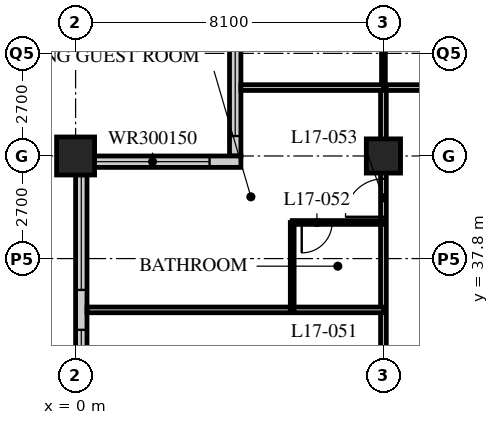
"""IFC4 building model, lengths in metres.
Left out: names, types, materials, properties, quantities, classifications, styles, units other than length and angle.
Written with IfcOpenShell. Run it as: python <this file> out.ifc"""

import sys

from ifc_helpers import new_model, si_unit, direction, frame, frame_2d, origin, origin_2d, place, context, subcontext, project, spatial, rectangle, hollow_rectangle, extrude, element, fill, save


model = new_model("IFC4")
c1 = context("Model", 3, precision=1e-05, world=origin(), true_north=direction((0.0, 1.0)))
c2 = subcontext(c1, "Body", "Model", "MODEL_VIEW")
j1 = project(units=[si_unit("LENGTHUNIT", "METRE"), si_unit("PLANEANGLEUNIT", "RADIAN")], contexts=[c1])
p1 = place(None, origin())
s1 = spatial("IfcSite", under=j1, at=p1, CompositionType="ELEMENT")
p2 = place(p1, origin())
s2 = spatial("IfcBuilding", under=s1, at=p2, CompositionType="ELEMENT")
p3 = place(p2, frame((0.0, 0.0, 70.4)))
s3 = spatial("IfcBuildingStorey", under=s2, at=p3, CompositionType="ELEMENT", Elevation=70.4)
p4 = place(p3, frame((0.0, 40.5, 0.0), z_axis=(0.0, 0.0, 1.0), x_axis=(1.0, 0.0, 0.0)))
e1 = element("IfcColumn", 1, at=p4, inside=s3, PredefinedType="COLUMN", context=c2, shape_type="SweptSolid", body=[
    extrude(hollow_rectangle(XDim=1.0, YDim=1.0, WallThickness=0.1, at=origin_2d()), origin(), (0.0, 0.0, 1.0), 3.4),
])
p5 = place(p3, frame((8.1, 40.5, 0.0), z_axis=(0.0, 0.0, 1.0), x_axis=(1.0, 0.0, 0.0)))
e2 = element("IfcColumn", 2, at=p5, inside=s3, PredefinedType="COLUMN", context=c2, shape_type="SweptSolid", body=[
    extrude(hollow_rectangle(XDim=0.9, YDim=0.9, WallThickness=0.09, at=origin_2d()), origin(), (0.0, 0.0, 1.0), 3.4),
])
p6 = place(p3, frame((4.2, 44.25, 0.0), z_axis=(0.0, 0.0, 1.0), x_axis=(0.0, -1.0, 0.0)))
e3 = element("IfcWall", 3, at=p6, inside=s3, PredefinedType="SOLIDWALL", context=c2, shape_type="SweptSolid", body=[
    extrude(rectangle(XDim=3.75, YDim=0.3, at=frame_2d((1.875, 0.0))), origin(), (0.0, 0.0, 1.0), 3.19),
])
p7 = place(p6, frame((0.225, 0.0, 0.9)))
e4 = element("IfcOpeningElement", 4, at=p7, cuts=e3, PredefinedType="OPENING", context=c2, shape_type="SweptSolid", body=[
    extrude(rectangle(XDim=3.0, YDim=1.5, at=frame_2d((1.5, 0.75))), frame((0.0, 0.16, 0.0), z_axis=(0.0, -1.0, 0.0), x_axis=(1.0, 0.0, 0.0)), (0.0, 0.0, 1.0), 0.32),
])
p8 = place(p3, frame((4.35, 40.35, 0.0), z_axis=(0.0, 0.0, 1.0), x_axis=(-1.0, 0.0, 0.0)))
e5 = element("IfcWall", 5, at=p8, inside=s3, PredefinedType="SOLIDWALL", context=c2, shape_type="SweptSolid", body=[
    extrude(rectangle(XDim=4.35, YDim=0.3, at=frame_2d((2.175, 0.0))), origin(), (0.0, 0.0, 1.0), 3.19),
])
p9 = place(p8, frame((0.825, 0.0, 0.9)))
e6 = element("IfcOpeningElement", 6, at=p9, cuts=e5, PredefinedType="OPENING", context=c2, shape_type="SweptSolid", body=[
    extrude(rectangle(XDim=3.0, YDim=1.5, at=frame_2d((1.5, 0.75))), frame((0.0, 0.16, 0.0), z_axis=(0.0, -1.0, 0.0), x_axis=(1.0, 0.0, 0.0)), (0.0, 0.0, 1.0), 0.32),
])
p10 = place(p3, frame((0.15, 40.2, 0.0), z_axis=(0.0, 0.0, 1.0), x_axis=(0.0, -1.0, 0.0)))
e7 = element("IfcWall", 7, at=p10, inside=s3, PredefinedType="SOLIDWALL", context=c2, shape_type="SweptSolid", body=[
    extrude(rectangle(XDim=32.1, YDim=0.3, at=frame_2d((16.05, 0.0))), origin(), (0.0, 0.0, 1.0), 3.19),
])
p11 = place(p10, frame((0.225, 0.0, 0.9)))
e8 = element("IfcOpeningElement", 8, at=p11, cuts=e7, PredefinedType="OPENING", context=c2, shape_type="SweptSolid", body=[
    extrude(rectangle(XDim=3.0, YDim=2.0, at=frame_2d((1.5, 1.0))), frame((0.0, 0.16, 0.0), z_axis=(0.0, -1.0, 0.0), x_axis=(1.0, 0.0, 0.0)), (0.0, 0.0, 1.0), 0.32),
])
p12 = place(p10, frame((4.275, 0.0, 0.9)))
e9 = element("IfcOpeningElement", 9, at=p12, cuts=e7, PredefinedType="OPENING", context=c2, shape_type="SweptSolid", body=[
    extrude(rectangle(XDim=3.0, YDim=2.0, at=frame_2d((1.5, 1.0))), frame((0.0, 0.16, 0.0), z_axis=(0.0, -1.0, 0.0), x_axis=(1.0, 0.0, 0.0)), (0.0, 0.0, 1.0), 0.32),
])
p13 = place(p10, frame((8.325, 0.0, 0.9)))
e10 = element("IfcOpeningElement", 10, at=p13, cuts=e7, PredefinedType="OPENING", context=c2, shape_type="SweptSolid", body=[
    extrude(rectangle(XDim=3.0, YDim=2.0, at=frame_2d((1.5, 1.0))), frame((0.0, 0.16, 0.0), z_axis=(0.0, -1.0, 0.0), x_axis=(1.0, 0.0, 0.0)), (0.0, 0.0, 1.0), 0.32),
])
p14 = place(p10, frame((12.375, 0.0, 0.9)))
e11 = element("IfcOpeningElement", 11, at=p14, cuts=e7, PredefinedType="OPENING", context=c2, shape_type="SweptSolid", body=[
    extrude(rectangle(XDim=3.0, YDim=2.0, at=frame_2d((1.5, 1.0))), frame((0.0, 0.16, 0.0), z_axis=(0.0, -1.0, 0.0), x_axis=(1.0, 0.0, 0.0)), (0.0, 0.0, 1.0), 0.32),
])
p15 = place(p10, frame((16.425, 0.0, 0.9)))
e12 = element("IfcOpeningElement", 12, at=p15, cuts=e7, PredefinedType="OPENING", context=c2, shape_type="SweptSolid", body=[
    extrude(rectangle(XDim=3.0, YDim=2.0, at=frame_2d((1.5, 1.0))), frame((0.0, 0.16, 0.0), z_axis=(0.0, -1.0, 0.0), x_axis=(1.0, 0.0, 0.0)), (0.0, 0.0, 1.0), 0.32),
])
p16 = place(p10, frame((20.475, 0.0, 0.9)))
e13 = element("IfcOpeningElement", 13, at=p16, cuts=e7, PredefinedType="OPENING", context=c2, shape_type="SweptSolid", body=[
    extrude(rectangle(XDim=3.0, YDim=2.0, at=frame_2d((1.5, 1.0))), frame((0.0, 0.16, 0.0), z_axis=(0.0, -1.0, 0.0), x_axis=(1.0, 0.0, 0.0)), (0.0, 0.0, 1.0), 0.32),
])
p17 = place(p10, frame((24.525, 0.0, 0.9)))
e14 = element("IfcOpeningElement", 14, at=p17, cuts=e7, PredefinedType="OPENING", context=c2, shape_type="SweptSolid", body=[
    extrude(rectangle(XDim=3.0, YDim=2.0, at=frame_2d((1.5, 1.0))), frame((0.0, 0.16, 0.0), z_axis=(0.0, -1.0, 0.0), x_axis=(1.0, 0.0, 0.0)), (0.0, 0.0, 1.0), 0.32),
])
p18 = place(p10, frame((28.575, 0.0, 0.9)))
e15 = element("IfcOpeningElement", 15, at=p18, cuts=e7, PredefinedType="OPENING", context=c2, shape_type="SweptSolid", body=[
    extrude(rectangle(XDim=3.0, YDim=2.0, at=frame_2d((1.5, 1.0))), frame((0.0, 0.16, 0.0), z_axis=(0.0, -1.0, 0.0), x_axis=(1.0, 0.0, 0.0)), (0.0, 0.0, 1.0), 0.32),
])
p19 = place(p3, frame((8.1, 42.3, 0.0), z_axis=(0.0, 0.0, 1.0), x_axis=(1.0, 0.0, 0.0)))
e16 = element("IfcWall", 16, at=p19, inside=s3, PredefinedType="PARTITIONING", context=c2, shape_type="SweptSolid", body=[
    extrude(rectangle(XDim=36.45, YDim=0.15, at=frame_2d((18.225, 0.0))), origin(), (0.0, 0.0, 1.0), 3.19),
])
p20 = place(p19, frame((9.5, 0.0, 0.0)))
e17 = element("IfcOpeningElement", 17, at=p20, cuts=e16, PredefinedType="OPENING", context=c2, shape_type="SweptSolid", body=[
    extrude(rectangle(XDim=1.0, YDim=2.1, at=frame_2d((0.5, 1.05))), frame((0.0, 0.085, 0.0), z_axis=(0.0, -1.0, 0.0), x_axis=(1.0, 0.0, 0.0)), (0.0, 0.0, 1.0), 0.17),
])
p21 = place(p19, frame((14.6, 0.0, 0.0)))
e18 = element("IfcOpeningElement", 18, at=p21, cuts=e16, PredefinedType="OPENING", context=c2, shape_type="SweptSolid", body=[
    extrude(rectangle(XDim=1.0, YDim=2.1, at=frame_2d((0.5, 1.05))), frame((0.0, 0.085, 0.0), z_axis=(0.0, -1.0, 0.0), x_axis=(1.0, 0.0, 0.0)), (0.0, 0.0, 1.0), 0.17),
])
p22 = place(p19, frame((18.65, 0.0, 0.0)))
e19 = element("IfcOpeningElement", 19, at=p22, cuts=e16, PredefinedType="OPENING", context=c2, shape_type="SweptSolid", body=[
    extrude(rectangle(XDim=1.0, YDim=2.1, at=frame_2d((0.5, 1.05))), frame((0.0, 0.085, 0.0), z_axis=(0.0, -1.0, 0.0), x_axis=(1.0, 0.0, 0.0)), (0.0, 0.0, 1.0), 0.17),
])
p23 = place(p19, frame((25.7, 0.0, 0.0)))
e20 = element("IfcOpeningElement", 20, at=p23, cuts=e16, PredefinedType="OPENING", context=c2, shape_type="SweptSolid", body=[
    extrude(rectangle(XDim=1.0, YDim=2.1, at=frame_2d((0.5, 1.05))), frame((0.0, 0.085, 0.0), z_axis=(0.0, -1.0, 0.0), x_axis=(1.0, 0.0, 0.0)), (0.0, 0.0, 1.0), 0.17),
])
p24 = place(p19, frame((30.8, 0.0, 0.0)))
e21 = element("IfcOpeningElement", 21, at=p24, cuts=e16, PredefinedType="OPENING", context=c2, shape_type="SweptSolid", body=[
    extrude(rectangle(XDim=1.0, YDim=2.1, at=frame_2d((0.5, 1.05))), frame((0.0, 0.085, 0.0), z_axis=(0.0, -1.0, 0.0), x_axis=(1.0, 0.0, 0.0)), (0.0, 0.0, 1.0), 0.17),
])
p25 = place(p19, frame((32.825, 0.0, 0.0)))
e22 = element("IfcOpeningElement", 22, at=p25, cuts=e16, PredefinedType="OPENING", context=c2, shape_type="SweptSolid", body=[
    extrude(rectangle(XDim=1.0, YDim=2.1, at=frame_2d((0.5, 1.05))), frame((0.0, 0.085, 0.0), z_axis=(0.0, -1.0, 0.0), x_axis=(1.0, 0.0, 0.0)), (0.0, 0.0, 1.0), 0.17),
])
p26 = place(p19, frame((2.625, 0.0, 0.0)))
e23 = element("IfcOpeningElement", 23, at=p26, cuts=e16, PredefinedType="OPENING", context=c2, shape_type="SweptSolid", body=[
    extrude(rectangle(XDim=1.0, YDim=2.1, at=frame_2d((0.5, 1.05))), frame((0.0, 0.085, 0.0), z_axis=(0.0, -1.0, 0.0), x_axis=(1.0, 0.0, 0.0)), (0.0, 0.0, 1.0), 0.17),
])
p27 = place(p3, frame((8.1, 12.15, 0.0), z_axis=(0.0, 0.0, 1.0), x_axis=(0.0, 1.0, 0.0)))
e24 = element("IfcWall", 24, at=p27, inside=s3, PredefinedType="PARTITIONING", context=c2, shape_type="SweptSolid", body=[
    extrude(rectangle(XDim=30.15, YDim=0.15, at=frame_2d((15.075, 0.0))), origin(), (0.0, 0.0, 1.0), 2.578),
])
p28 = place(p27, frame((0.6, 0.0, 0.0)))
e25 = element("IfcOpeningElement", 25, at=p28, cuts=e24, PredefinedType="OPENING", context=c2, shape_type="SweptSolid", body=[
    extrude(rectangle(XDim=1.0, YDim=2.1, at=frame_2d((0.5, 1.05))), frame((0.0, 0.085, 0.0), z_axis=(0.0, -1.0, 0.0), x_axis=(1.0, 0.0, 0.0)), (0.0, 0.0, 1.0), 0.17),
])
p29 = place(p27, frame((6.8, 0.0, 0.0)))
e26 = element("IfcOpeningElement", 26, at=p29, cuts=e24, PredefinedType="OPENING", context=c2, shape_type="SweptSolid", body=[
    extrude(rectangle(XDim=1.0, YDim=2.1, at=frame_2d((0.5, 1.05))), frame((0.0, 0.085, 0.0), z_axis=(0.0, -1.0, 0.0), x_axis=(1.0, 0.0, 0.0)), (0.0, 0.0, 1.0), 0.17),
])
p30 = place(p27, frame((8.7, 0.0, 0.0)))
e27 = element("IfcOpeningElement", 27, at=p30, cuts=e24, PredefinedType="OPENING", context=c2, shape_type="SweptSolid", body=[
    extrude(rectangle(XDim=1.0, YDim=2.1, at=frame_2d((0.5, 1.05))), frame((0.0, 0.085, 0.0), z_axis=(0.0, -1.0, 0.0), x_axis=(1.0, 0.0, 0.0)), (0.0, 0.0, 1.0), 0.17),
])
p31 = place(p27, frame((14.6, 0.0, 0.0)))
e28 = element("IfcOpeningElement", 28, at=p31, cuts=e24, PredefinedType="OPENING", context=c2, shape_type="SweptSolid", body=[
    extrude(rectangle(XDim=1.0, YDim=2.1, at=frame_2d((0.5, 1.05))), frame((0.0, 0.085, 0.0), z_axis=(0.0, -1.0, 0.0), x_axis=(1.0, 0.0, 0.0)), (0.0, 0.0, 1.0), 0.17),
])
p32 = place(p27, frame((21.65, 0.0, 0.0)))
e29 = element("IfcOpeningElement", 29, at=p32, cuts=e24, PredefinedType="OPENING", context=c2, shape_type="SweptSolid", body=[
    extrude(rectangle(XDim=1.0, YDim=2.1, at=frame_2d((0.5, 1.05))), frame((0.0, 0.085, 0.0), z_axis=(0.0, -1.0, 0.0), x_axis=(1.0, 0.0, 0.0)), (0.0, 0.0, 1.0), 0.17),
])
p33 = place(p27, frame((26.75, 0.0, 0.0)))
e30 = element("IfcOpeningElement", 30, at=p33, cuts=e24, PredefinedType="OPENING", context=c2, shape_type="SweptSolid", body=[
    extrude(rectangle(XDim=1.0, YDim=2.1, at=frame_2d((0.5, 1.05))), frame((0.0, 0.085, 0.0), z_axis=(0.0, -1.0, 0.0), x_axis=(1.0, 0.0, 0.0)), (0.0, 0.0, 1.0), 0.17),
])
p34 = place(p3, frame((8.1, 36.45, 0.0), z_axis=(0.0, 0.0, 1.0), x_axis=(-1.0, 0.0, 0.0)))
e31 = element("IfcWall", 31, at=p34, inside=s3, PredefinedType="PARTITIONING", context=c2, shape_type="SweptSolid", body=[
    extrude(rectangle(XDim=7.8, YDim=0.15, at=frame_2d((3.9, 0.0))), origin(), (0.0, 0.0, 1.0), 3.19),
])
p35 = place(p3, frame((5.7, 36.45, 0.0), z_axis=(0.0, 0.0, 1.0), x_axis=(0.0, 1.0, 0.0)))
e32 = element("IfcWall", 32, at=p35, inside=s3, PredefinedType="PARTITIONING", context=c2, shape_type="SweptSolid", body=[
    extrude(rectangle(XDim=2.3, YDim=0.1, at=frame_2d((1.15, 0.0))), origin(), (0.0, 0.0, 1.0), 3.19),
])
p36 = place(p3, frame((8.1, 38.75, 0.0), z_axis=(0.0, 0.0, 1.0), x_axis=(-1.0, 0.0, 0.0)))
e33 = element("IfcWall", 33, at=p36, inside=s3, PredefinedType="PARTITIONING", context=c2, shape_type="SweptSolid", body=[
    extrude(rectangle(XDim=2.4, YDim=0.1, at=frame_2d((1.2, 0.0))), origin(), (0.0, 0.0, 1.0), 3.19),
])
p37 = place(p36, frame((1.35, 0.0, 0.0)))
e34 = element("IfcOpeningElement", 34, at=p37, cuts=e33, PredefinedType="OPENING", context=c2, shape_type="SweptSolid", body=[
    extrude(rectangle(XDim=0.8, YDim=2.1, at=frame_2d((0.4, 1.05))), frame((0.0, 0.06, 0.0), z_axis=(0.0, -1.0, 0.0), x_axis=(1.0, 0.0, 0.0)), (0.0, 0.0, 1.0), 0.12),
])
p38 = place(p3, frame((8.1, 42.3, 0.0), z_axis=(0.0, 0.0, 1.0), x_axis=(0.0, 1.0, 0.0)))
e35 = element("IfcWall", 35, at=p38, inside=s3, PredefinedType="PARTITIONING", context=c2, shape_type="SweptSolid", body=[
    extrude(rectangle(XDim=2.25, YDim=0.1, at=frame_2d((1.125, 0.0))), origin(), (0.0, 0.0, 1.0), 2.578),
])
p39 = place(p3, frame((4.35, 42.3, 0.0), z_axis=(0.0, 0.0, 1.0), x_axis=(1.0, 0.0, 0.0)))
e36 = element("IfcWall", 36, at=p39, inside=s3, PredefinedType="PARTITIONING", context=c2, shape_type="SweptSolid", body=[
    extrude(rectangle(XDim=3.75, YDim=0.15, at=frame_2d((1.875, 0.0))), origin(), (0.0, 0.0, 1.0), 3.19),
])
p40 = place(p7, origin())
e37 = element("IfcWindow", 37, at=p40, inside=s3, PartitioningType="SINGLE_PANEL", PredefinedType="WINDOW", context=c2, shape_type="SweptSolid", body=[
    extrude(rectangle(XDim=3.0, YDim=1.5, at=frame_2d((1.5, 0.75))), frame((0.0, 0.03, 0.0), z_axis=(0.0, -1.0, 0.0), x_axis=(1.0, 0.0, 0.0)), (0.0, 0.0, 1.0), 0.06),
])
fill(e4, e37)
p41 = place(p9, origin())
e38 = element("IfcWindow", 38, at=p41, inside=s3, PartitioningType="SINGLE_PANEL", PredefinedType="WINDOW", context=c2, shape_type="SweptSolid", body=[
    extrude(rectangle(XDim=3.0, YDim=1.5, at=frame_2d((1.5, 0.75))), frame((0.0, 0.03, 0.0), z_axis=(0.0, -1.0, 0.0), x_axis=(1.0, 0.0, 0.0)), (0.0, 0.0, 1.0), 0.06),
])
fill(e6, e38)
p42 = place(p11, origin())
e39 = element("IfcWindow", 39, at=p42, inside=s3, PartitioningType="SINGLE_PANEL", PredefinedType="WINDOW", context=c2, shape_type="SweptSolid", body=[
    extrude(rectangle(XDim=3.0, YDim=2.0, at=frame_2d((1.5, 1.0))), frame((0.0, 0.03, 0.0), z_axis=(0.0, -1.0, 0.0), x_axis=(1.0, 0.0, 0.0)), (0.0, 0.0, 1.0), 0.06),
])
fill(e8, e39)
p43 = place(p12, origin())
e40 = element("IfcWindow", 40, at=p43, inside=s3, PartitioningType="SINGLE_PANEL", PredefinedType="WINDOW", context=c2, shape_type="SweptSolid", body=[
    extrude(rectangle(XDim=3.0, YDim=2.0, at=frame_2d((1.5, 1.0))), frame((0.0, 0.03, 0.0), z_axis=(0.0, -1.0, 0.0), x_axis=(1.0, 0.0, 0.0)), (0.0, 0.0, 1.0), 0.06),
])
fill(e9, e40)
p44 = place(p37, origin())
e41 = element("IfcDoor", 41, at=p44, inside=s3, OperationType="SINGLE_SWING_RIGHT", PredefinedType="DOOR", context=c2, shape_type="SweptSolid", body=[
    extrude(rectangle(XDim=0.8, YDim=2.1, at=frame_2d((0.4, 1.05))), frame((0.0, 0.025, 0.0), z_axis=(0.0, -1.0, 0.0), x_axis=(1.0, 0.0, 0.0)), (0.0, 0.0, 1.0), 0.05),
])
fill(e34, e41)
p45 = place(p33, origin())
e42 = element("IfcDoor", 42, at=p45, inside=s3, OperationType="SINGLE_SWING_LEFT", PredefinedType="DOOR", context=c2, shape_type="SweptSolid", body=[
    extrude(rectangle(XDim=1.0, YDim=2.1, at=frame_2d((0.5, 1.05))), frame((0.0, 0.025, 0.0), z_axis=(0.0, -1.0, 0.0), x_axis=(1.0, 0.0, 0.0)), (0.0, 0.0, 1.0), 0.05),
])
fill(e30, e42)
save(model, sys.argv[1])
